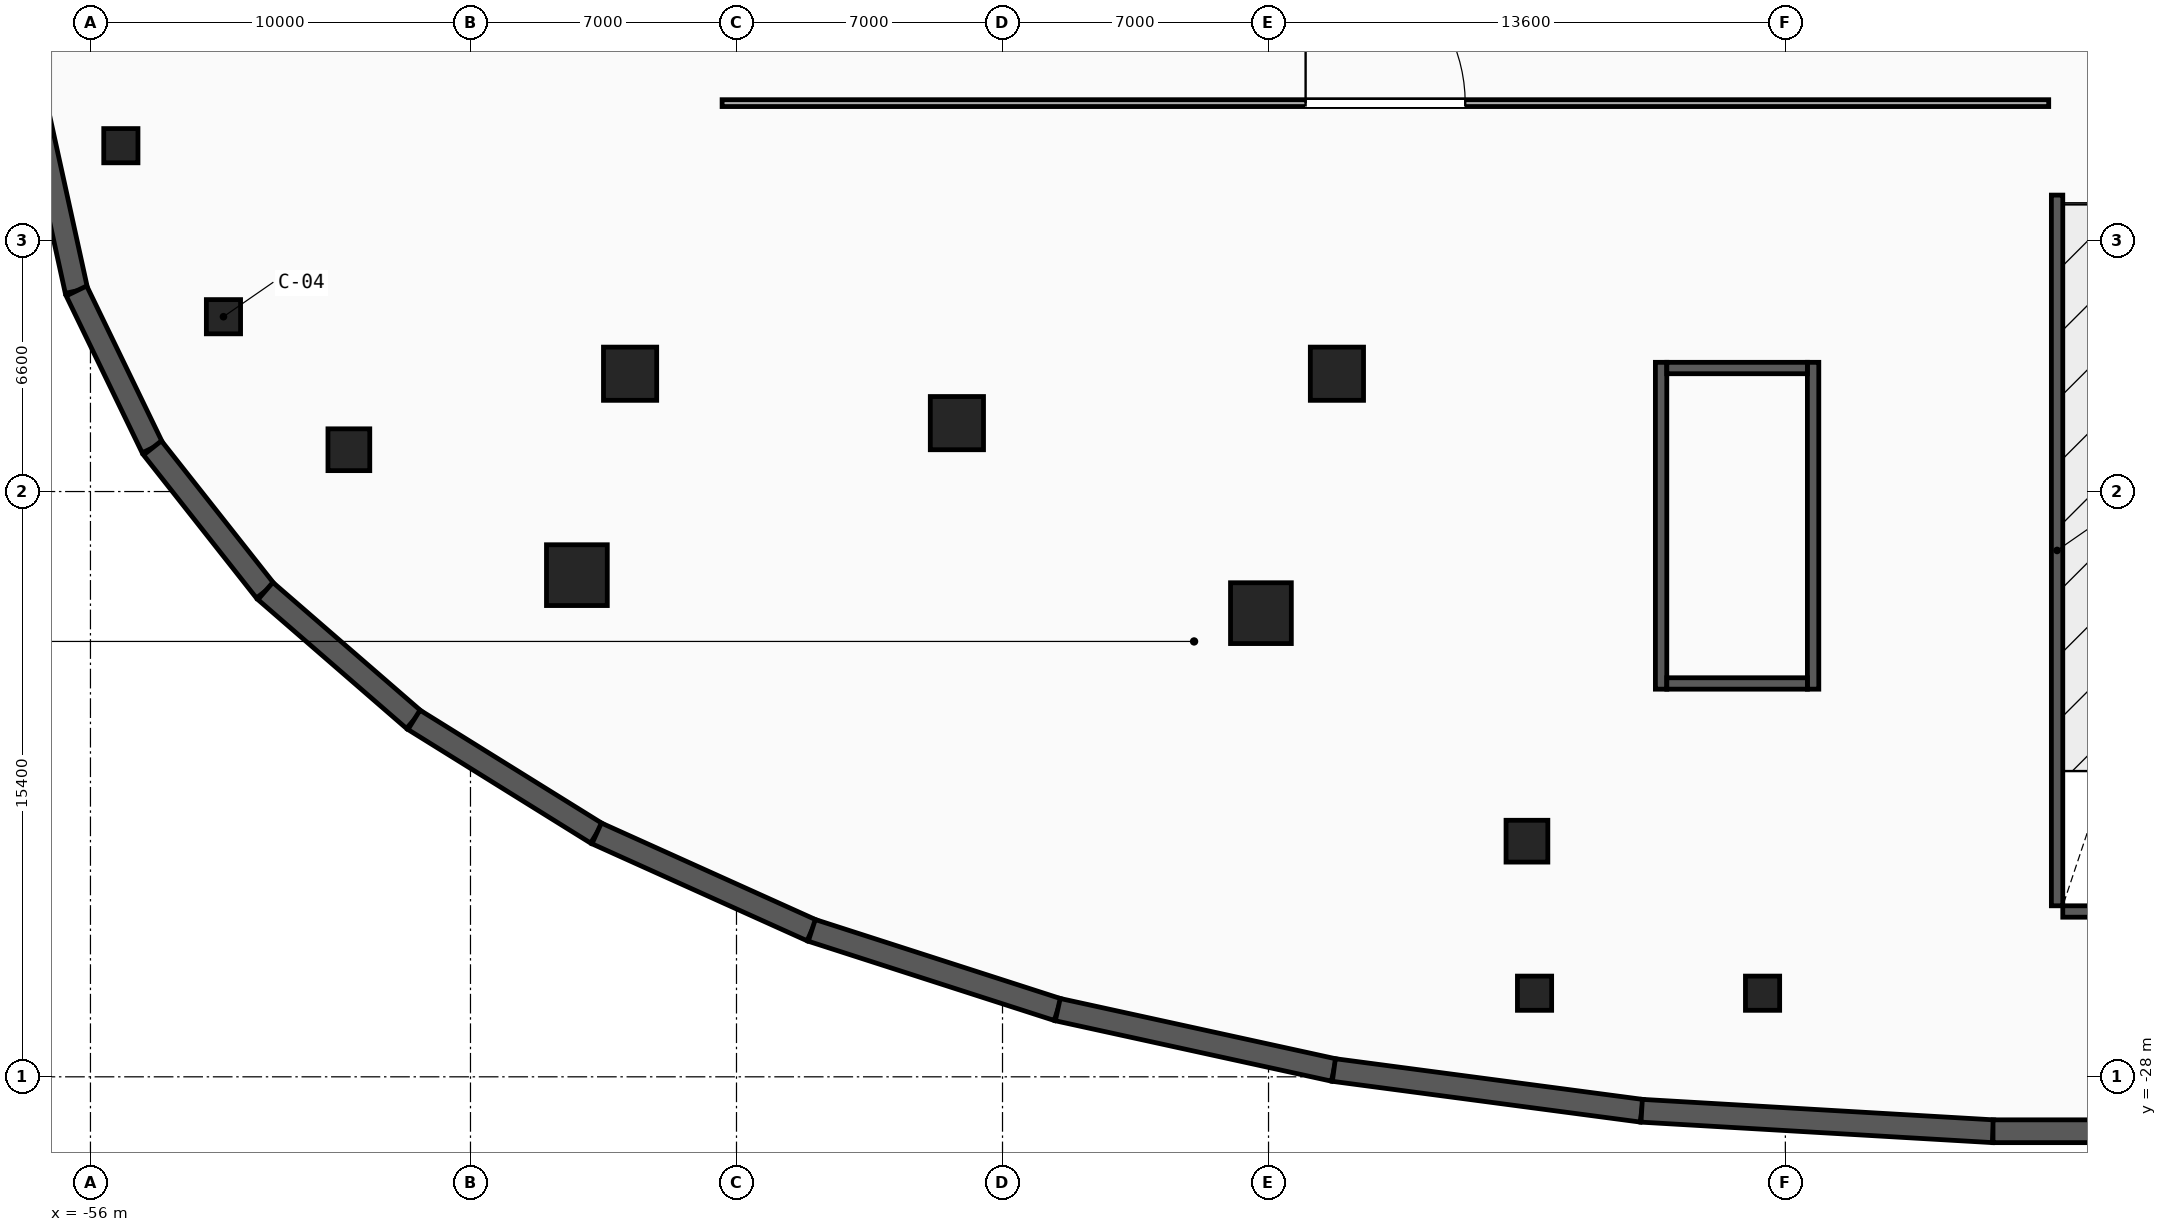
"""IFC4 building model, lengths in metres.
Left out: names, types, materials, properties, quantities, classifications, styles, units other than length and angle.
Written with IfcOpenShell. Run it as: python <this file> out.ifc"""

import sys

from ifc_helpers import new_model, si_unit, direction, frame, frame_2d, origin, origin_2d, place, context, subcontext, project, spatial, rectangle, circle, extrude, element, fill, save


model = new_model("IFC4")
c1 = context("Model", 3, precision=1e-05, world=origin(), true_north=direction((0.0, 1.0)))
c2 = subcontext(c1, "Body", "Model", "MODEL_VIEW")
j1 = project(units=[si_unit("LENGTHUNIT", "METRE"), si_unit("PLANEANGLEUNIT", "RADIAN")], contexts=[c1])
p1 = place(None, origin())
s1 = spatial("IfcSite", under=j1, at=p1, CompositionType="ELEMENT")
p2 = place(p1, origin())
s2 = spatial("IfcBuilding", under=s1, at=p2, CompositionType="ELEMENT")
p3 = place(p2, frame((0.0, 0.0, -4.5)))
s3 = spatial("IfcBuildingStorey", under=s2, at=p3, CompositionType="ELEMENT", Elevation=-4.5)
for number, where, z_axis, x_axis in (
    (1, (-41.8, -9.5, 0.0), (0.0, 0.0, 1.0), (1.0, 0.0, 0.0)),
    (2, (-33.2, -10.8, 0.0), (0.0, 0.0, 1.0), (1.0, 0.0, 0.0)),
    (3, (-23.2, -9.5, 0.0), (0.0, 0.0, 1.0), (1.0, 0.0, 0.0)),
):
    element("IfcColumn", number, at=place(p3, frame(where, z_axis=z_axis, x_axis=x_axis)), inside=s3, PredefinedType="COLUMN", context=c2, shape_type="SweptSolid", body=[
        extrude(rectangle(XDim=1.4, YDim=1.4, at=origin_2d()), origin(), (0.0, 0.0, 1.0), 4.5),
    ])
for number, where, z_axis, x_axis in (
    (4, (-43.2, -14.8, 0.0), (0.0, 0.0, 1.0), (1.0, 0.0, 0.0)),
    (5, (-25.2, -15.8, 0.0), (0.0, 0.0, 1.0), (1.0, 0.0, 0.0)),
):
    element("IfcColumn", number, at=place(p3, frame(where, z_axis=z_axis, x_axis=x_axis)), inside=s3, PredefinedType="COLUMN", context=c2, shape_type="SweptSolid", body=[
        extrude(rectangle(XDim=1.6, YDim=1.6, at=origin_2d()), origin(), (0.0, 0.0, 1.0), 4.5),
    ])
for number, where, z_axis, x_axis in (
    (6, (-49.2, -11.5, 0.0), (0.0, 0.0, 1.0), (1.0, 0.0, 0.0)),
    (7, (-18.2, -21.8, 0.0), (0.0, 0.0, 1.0), (1.0, 0.0, 0.0)),
):
    element("IfcColumn", number, at=place(p3, frame(where, z_axis=z_axis, x_axis=x_axis)), inside=s3, PredefinedType="PILASTER", context=c2, shape_type="SweptSolid", body=[
        extrude(circle(Radius=0.55, at=origin_2d()), origin(), (0.0, 0.0, 1.0), 4.5),
    ])
for number, where, z_axis, x_axis in (
    (8, (-52.5, -8.0, 0.0), (0.0, 0.0, 1.0), (1.0, 0.0, 0.0)),
    (9, (-55.2, -3.5, 0.0), (0.0, 0.0, 1.0), (1.0, 0.0, 0.0)),
    (10, (-18.0, -25.8, 0.0), (0.0, 0.0, 1.0), (1.0, 0.0, 0.0)),
    (11, (-12.0, -25.8, 0.0), (0.0, 0.0, 1.0), (1.0, 0.0, 0.0)),
):
    element("IfcColumn", number, at=place(p3, frame(where, z_axis=z_axis, x_axis=x_axis)), inside=s3, PredefinedType="COLUMN", context=c2, shape_type="SweptSolid", body=[
        extrude(rectangle(XDim=0.9, YDim=0.9, at=origin_2d()), origin(), (0.0, 0.0, 1.0), 4.5),
    ])
p4 = place(p3, frame((-57.374, -2.74, 0.0), z_axis=(0.0, 0.0, 1.0), x_axis=(0.214510247434, -0.976721738135, 0.0)))
e12 = element("IfcWall", 12, at=p4, inside=s3, PredefinedType="USERDEFINED", context=c2, shape_type="SweptSolid", body=[
    extrude(rectangle(XDim=4.69, YDim=0.6, at=frame_2d((2.345, 0.0))), origin(), (0.0, 0.0, 1.0), 4.15),
])
p5 = place(p3, frame((-56.368, -7.321, 0.0), z_axis=(0.0, 0.0, 1.0), x_axis=(0.435772260249, -0.900056963307, 0.0)))
e13 = element("IfcWall", 13, at=p5, inside=s3, PredefinedType="USERDEFINED", context=c2, shape_type="SweptSolid", body=[
    extrude(rectangle(XDim=4.59, YDim=0.6, at=frame_2d((2.295, 0.0))), origin(), (0.0, 0.0, 1.0), 4.15),
])
p6 = place(p3, frame((-54.368, -11.452, 0.0), z_axis=(0.0, 0.0, 1.0), x_axis=(0.619447864054, -0.785037797637, 0.0)))
e14 = element("IfcWall", 14, at=p6, inside=s3, PredefinedType="USERDEFINED", context=c2, shape_type="SweptSolid", body=[
    extrude(rectangle(XDim=4.796, YDim=0.6, at=frame_2d((2.398, 0.0))), origin(), (0.0, 0.0, 1.0), 4.15),
])
p7 = place(p3, frame((-51.397, -15.217, 0.0), z_axis=(0.0, 0.0, 1.0), x_axis=(0.755564536906, -0.655074217605, 0.0)))
e15 = element("IfcWall", 15, at=p7, inside=s3, PredefinedType="USERDEFINED", context=c2, shape_type="SweptSolid", body=[
    extrude(rectangle(XDim=5.175, YDim=0.6, at=frame_2d((2.587, 0.0))), origin(), (0.0, 0.0, 1.0), 4.15),
])
p8 = place(p3, frame((-47.487, -18.607, 0.0), z_axis=(0.0, 0.0, 1.0), x_axis=(0.849299437699, -0.527911417877, 0.0)))
e16 = element("IfcWall", 16, at=p8, inside=s3, PredefinedType="USERDEFINED", context=c2, shape_type="SweptSolid", body=[
    extrude(rectangle(XDim=5.66, YDim=0.6, at=frame_2d((2.83, 0.0))), origin(), (0.0, 0.0, 1.0), 4.15),
])
p9 = place(p3, frame((-42.68, -21.595, 0.0), z_axis=(0.0, 0.0, 1.0), x_axis=(0.911643952457, -0.410980904603, 0.0)))
e17 = element("IfcWall", 17, at=p9, inside=s3, PredefinedType="USERDEFINED", context=c2, shape_type="SweptSolid", body=[
    extrude(rectangle(XDim=6.209, YDim=0.6, at=frame_2d((3.105, 0.0))), origin(), (0.0, 0.0, 1.0), 4.15),
])
p10 = place(p3, frame((-37.019, -24.147, 0.0), z_axis=(0.0, 0.0, 1.0), x_axis=(0.951843868052, -0.306583187492, 0.0)))
e18 = element("IfcWall", 18, at=p10, inside=s3, PredefinedType="USERDEFINED", context=c2, shape_type="SweptSolid", body=[
    extrude(rectangle(XDim=6.801, YDim=0.6, at=frame_2d((3.4, 0.0))), origin(), (0.0, 0.0, 1.0), 4.15),
])
p11 = place(p3, frame((-30.546, -26.232, 0.0), z_axis=(0.0, 0.0, 1.0), x_axis=(0.976902373216, -0.213686109059, 0.0)))
e19 = element("IfcWall", 19, at=p11, inside=s3, PredefinedType="USERDEFINED", context=c2, shape_type="SweptSolid", body=[
    extrude(rectangle(XDim=7.437, YDim=0.6, at=frame_2d((3.718, 0.0))), origin(), (0.0, 0.0, 1.0), 4.15),
])
p12 = place(p3, frame((-23.281, -27.821, 0.0), z_axis=(0.0, 0.0, 1.0), x_axis=(0.991355566156, -0.131202673187, 0.0)))
e20 = element("IfcWall", 20, at=p12, inside=s3, PredefinedType="USERDEFINED", context=c2, shape_type="SweptSolid", body=[
    extrude(rectangle(XDim=8.171, YDim=0.6, at=frame_2d((4.085, 0.0))), origin(), (0.0, 0.0, 1.0), 4.15),
])
p13 = place(p3, frame((-15.181, -28.893, 0.0), z_axis=(0.0, 0.0, 1.0), x_axis=(0.998305864477, -0.058184198455, 0.0)))
e21 = element("IfcWall", 21, at=p13, inside=s3, PredefinedType="USERDEFINED", context=c2, shape_type="SweptSolid", body=[
    extrude(rectangle(XDim=9.26, YDim=0.6, at=frame_2d((4.63, 0.0))), origin(), (0.0, 0.0, 1.0), 4.15),
])
p14 = place(p3, frame((-5.936, -29.432, 0.0), z_axis=(0.0, 0.0, 1.0), x_axis=(1.0, 0.0, 0.0)))
e22 = element("IfcWall", 22, at=p14, inside=s3, PredefinedType="USERDEFINED", context=c2, shape_type="SweptSolid", body=[
    extrude(rectangle(XDim=11.872, YDim=0.6, at=frame_2d((5.936, 0.0))), origin(), (0.0, 0.0, 1.0), 4.15),
])
p15 = place(p3, frame((-4.25, -23.5, 0.0), z_axis=(0.0, 0.0, 1.0), x_axis=(0.0, 1.0, 0.0)))
e23 = element("IfcWall", 23, at=p15, inside=s3, PredefinedType="SHEAR", context=c2, shape_type="SweptSolid", body=[
    extrude(rectangle(XDim=18.7, YDim=0.3, at=frame_2d((9.35, 0.0))), origin(), (0.0, 0.0, 1.0), 4.5),
])
p16 = place(p3, frame((-4.1, -23.65, 0.0), z_axis=(0.0, 0.0, 1.0), x_axis=(1.0, 0.0, 0.0)))
e24 = element("IfcWall", 24, at=p16, inside=s3, PredefinedType="SHEAR", context=c2, shape_type="SweptSolid", body=[
    extrude(rectangle(XDim=6.2, YDim=0.3, at=frame_2d((3.1, 0.0))), origin(), (0.0, 0.0, 1.0), 4.5),
])
for number, where, z_axis, x_axis in (
    (25, (-14.67, -17.8, 0.0), (0.0, 0.0, 1.0), (0.0, 1.0, 0.0)),
    (26, (-10.67, -17.8, 0.0), (0.0, 0.0, 1.0), (0.0, 1.0, 0.0)),
):
    element("IfcWall", number, at=place(p3, frame(where, z_axis=z_axis, x_axis=x_axis)), inside=s3, PredefinedType="SHEAR", context=c2, shape_type="SweptSolid", body=[
        extrude(rectangle(XDim=8.6, YDim=0.3, at=frame_2d((4.3, 0.0))), origin(), (0.0, 0.0, 1.0), 4.15),
    ])
for number, where, z_axis, x_axis in (
    (27, (-14.52, -17.65, 0.0), (0.0, 0.0, 1.0), (1.0, 0.0, 0.0)),
    (28, (-14.52, -9.35, 0.0), (0.0, 0.0, 1.0), (1.0, 0.0, 0.0)),
):
    element("IfcWall", number, at=place(p3, frame(where, z_axis=z_axis, x_axis=x_axis)), inside=s3, PredefinedType="SHEAR", context=c2, shape_type="SweptSolid", body=[
        extrude(rectangle(XDim=3.7, YDim=0.3, at=frame_2d((1.85, 0.0))), origin(), (0.0, 0.0, 1.0), 4.15),
    ])
p17 = place(p3, frame((-39.378, -2.38, 0.0), z_axis=(0.0, 0.0, 1.0), x_axis=(1.0, 0.0, 0.0)))
e29 = element("IfcWall", 29, at=p17, inside=s3, PredefinedType="PARTITIONING", context=c2, shape_type="SweptSolid", body=[
    extrude(rectangle(XDim=34.908, YDim=0.18, at=frame_2d((17.454, 0.0))), origin(), (0.0, 0.0, 1.0), 4.15),
])
p18 = place(p17, frame((15.354, 0.0, 0.0)))
e30 = element("IfcOpeningElement", 30, at=p18, cuts=e29, PredefinedType="OPENING", context=c2, shape_type="SweptSolid", body=[
    extrude(rectangle(XDim=4.2, YDim=2.8, at=frame_2d((2.1, 1.4))), frame((0.0, 0.1, 0.0), z_axis=(0.0, -1.0, 0.0), x_axis=(1.0, 0.0, 0.0)), (0.0, 0.0, 1.0), 0.2),
])
p19 = place(p18, origin())
e31 = element("IfcDoor", 31, at=p19, inside=s3, OperationType="SINGLE_SWING_LEFT", PredefinedType="GATE", context=c2, shape_type="SweptSolid", body=[
    extrude(rectangle(XDim=4.2, YDim=2.8, at=frame_2d((2.1, 1.4))), frame((0.0, 0.025, 0.0), z_axis=(0.0, -1.0, 0.0), x_axis=(1.0, 0.0, 0.0)), (0.0, 0.0, 1.0), 0.05),
])
fill(e30, e31)
save(model, sys.argv[1])
